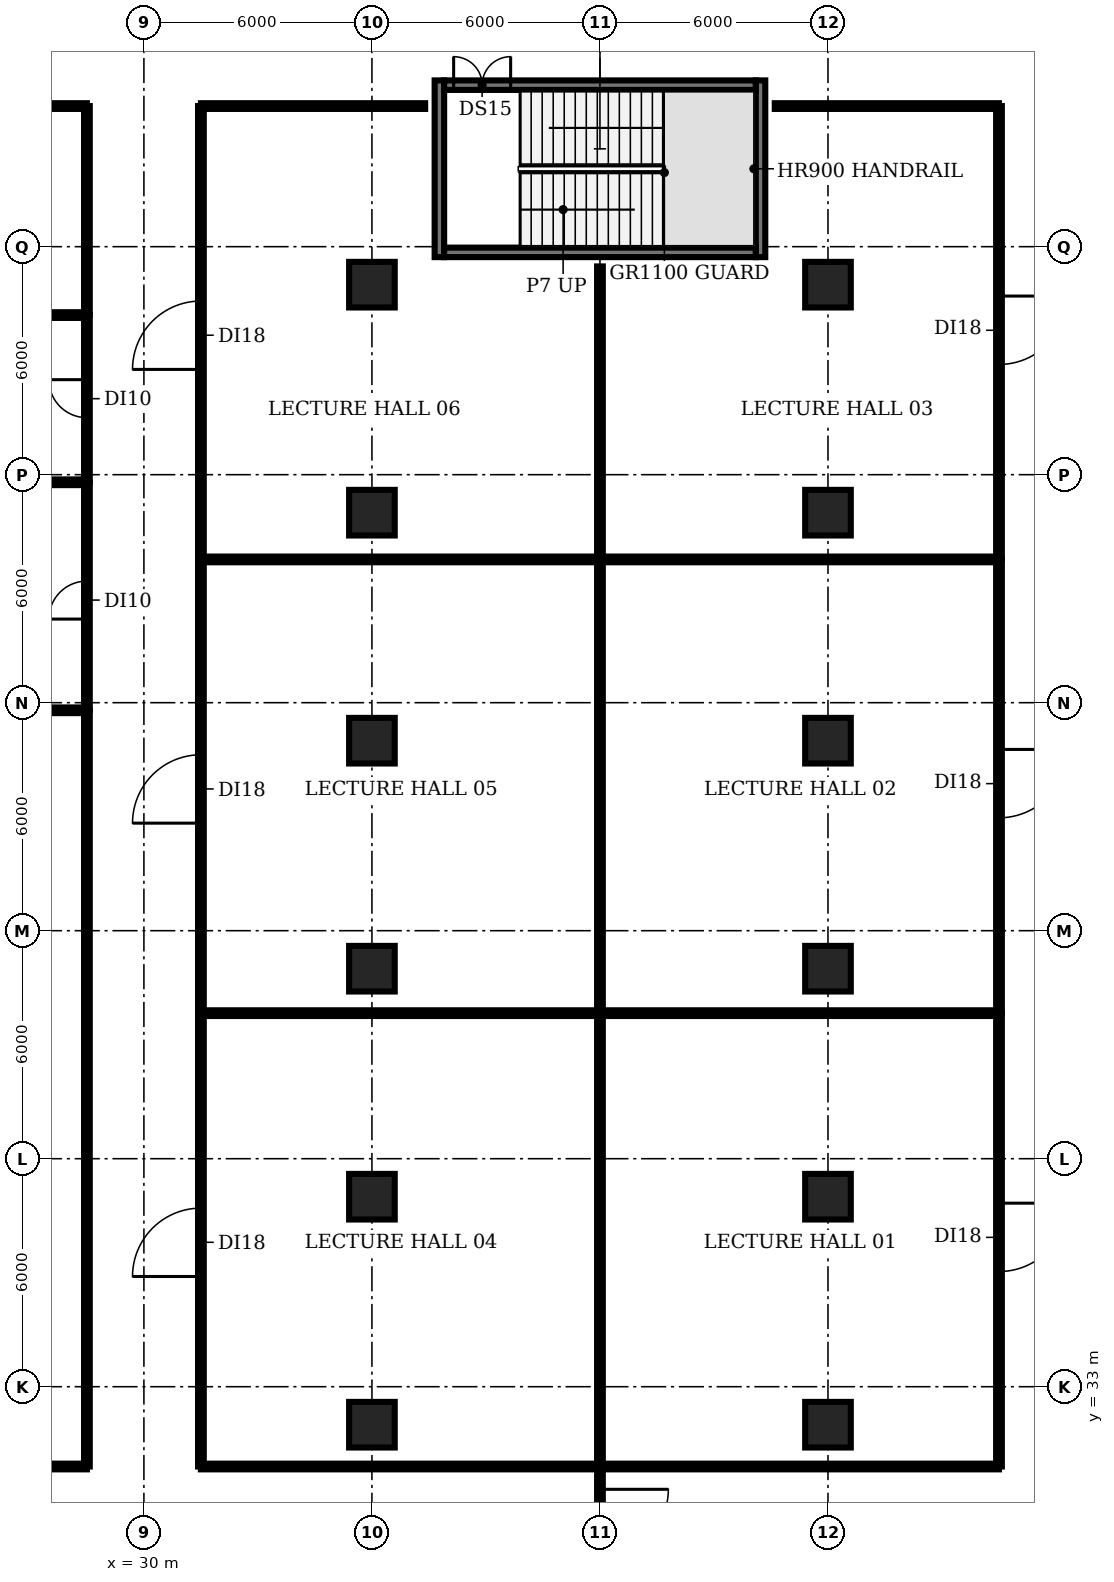
"""IFC4 building model, lengths in metres.
Left out: names, types, materials, properties, quantities, classifications, styles, units other than length and angle.
Written with IfcOpenShell. Run it as: python <this file> out.ifc"""

import sys

from ifc_helpers import new_model, si_unit, direction, frame, frame_2d, origin, origin_2d, place, context, subcontext, project, spatial, rectangle, extrude, element, fill, save


model = new_model("IFC4")
c1 = context("Model", 3, precision=1e-05, world=origin(), true_north=direction((0.0, 1.0)))
c2 = subcontext(c1, "Body", "Model", "MODEL_VIEW")
j1 = project(units=[si_unit("LENGTHUNIT", "METRE"), si_unit("PLANEANGLEUNIT", "RADIAN")], contexts=[c1])
p1 = place(None, origin())
s1 = spatial("IfcSite", under=j1, at=p1, CompositionType="ELEMENT")
p2 = place(p1, origin())
s2 = spatial("IfcBuilding", under=s1, at=p2, CompositionType="ELEMENT")
p3 = place(p2, frame((0.0, 0.0, 6.0)))
s3 = spatial("IfcBuildingStorey", under=s2, at=p3, CompositionType="ELEMENT", Elevation=6.0)
for number, where, z_axis, x_axis in (
    (1, (36.0, 32.0, 0.0), (0.0, 0.0, 1.0), (1.0, 0.0, 0.0)),
    (2, (36.0, 38.0, 0.0), (0.0, 0.0, 1.0), (1.0, 0.0, 0.0)),
    (3, (36.0, 44.0, 0.0), (0.0, 0.0, 1.0), (1.0, 0.0, 0.0)),
    (4, (36.0, 50.0, 0.0), (0.0, 0.0, 1.0), (1.0, 0.0, 0.0)),
    (5, (36.0, 56.0, 0.0), (0.0, 0.0, 1.0), (1.0, 0.0, 0.0)),
    (6, (36.0, 62.0, 0.0), (0.0, 0.0, 1.0), (1.0, 0.0, 0.0)),
    (7, (48.0, 32.0, 0.0), (0.0, 0.0, 1.0), (1.0, 0.0, 0.0)),
    (8, (48.0, 38.0, 0.0), (0.0, 0.0, 1.0), (1.0, 0.0, 0.0)),
    (9, (48.0, 44.0, 0.0), (0.0, 0.0, 1.0), (1.0, 0.0, 0.0)),
    (10, (48.0, 50.0, 0.0), (0.0, 0.0, 1.0), (1.0, 0.0, 0.0)),
    (11, (48.0, 56.0, 0.0), (0.0, 0.0, 1.0), (1.0, 0.0, 0.0)),
    (12, (48.0, 62.0, 0.0), (0.0, 0.0, 1.0), (1.0, 0.0, 0.0)),
):
    element("IfcColumn", number, at=place(p3, frame(where, z_axis=z_axis, x_axis=x_axis)), inside=s3, PredefinedType="COLUMN", context=c2, shape_type="SweptSolid", body=[
        extrude(rectangle(XDim=1.2, YDim=1.2, at=origin_2d()), origin(), (0.0, 0.0, 1.0), 4.6),
    ])
for number, where, z_axis, x_axis in (
    (13, (37.775, 62.725, 0.0), (0.0, 0.0, 1.0), (0.0, 1.0, 0.0)),
    (14, (46.225, 62.725, 0.0), (0.0, 0.0, 1.0), (0.0, 1.0, 0.0)),
):
    element("IfcWall", number, at=place(p3, frame(where, z_axis=z_axis, x_axis=x_axis)), inside=s3, PredefinedType="SHEAR", context=c2, shape_type="SweptSolid", body=[
        extrude(rectangle(XDim=4.65, YDim=0.25, at=frame_2d((2.325, 0.0))), origin(), (0.0, 0.0, 1.0), 4.6),
    ])
p4 = place(p3, frame((37.9, 62.85, 0.0), z_axis=(0.0, 0.0, 1.0), x_axis=(1.0, 0.0, 0.0)))
e15 = element("IfcWall", 15, at=p4, inside=s3, PredefinedType="SHEAR", context=c2, shape_type="SweptSolid", body=[
    extrude(rectangle(XDim=8.2, YDim=0.25, at=frame_2d((4.1, 0.0))), origin(), (0.0, 0.0, 1.0), 4.6),
])
p5 = place(p3, frame((37.9, 67.25, 0.0), z_axis=(0.0, 0.0, 1.0), x_axis=(1.0, 0.0, 0.0)))
e16 = element("IfcWall", 16, at=p5, inside=s3, PredefinedType="SHEAR", context=c2, shape_type="SweptSolid", body=[
    extrude(rectangle(XDim=8.2, YDim=0.25, at=frame_2d((4.1, 0.0))), origin(), (0.0, 0.0, 1.0), 4.6),
])
p6 = place(p5, frame((0.25, 0.0, 0.0)))
e17 = element("IfcOpeningElement", 17, at=p6, cuts=e16, PredefinedType="OPENING", context=c2, shape_type="SweptSolid", body=[
    extrude(rectangle(XDim=1.5, YDim=2.1, at=frame_2d((0.75, 1.05))), frame((0.0, 0.135, 0.0), z_axis=(0.0, -1.0, 0.0), x_axis=(1.0, 0.0, 0.0)), (0.0, 0.0, 1.0), 0.27),
])
p7 = place(p3, frame((-3.7, 50.8, 0.0), z_axis=(0.0, 0.0, 1.0), x_axis=(1.0, 0.0, 0.0)))
e18 = element("IfcWall", 18, at=p7, inside=s3, PredefinedType="PARTITIONING", context=c2, shape_type="SweptSolid", body=[
    extrude(rectangle(XDim=32.2, YDim=0.15, at=frame_2d((16.1, 0.0))), origin(), (0.0, 0.0, 1.0), 3.18),
])
for number, where, z_axis, x_axis in (
    (19, (5.58, 56.8, 0.0), (0.0, 0.0, 1.0), (1.0, 0.0, 0.0)),
    (20, (5.58, 61.2, 0.0), (0.0, 0.0, 1.0), (1.0, 0.0, 0.0)),
):
    element("IfcWall", number, at=place(p3, frame(where, z_axis=z_axis, x_axis=x_axis)), inside=s3, PredefinedType="PARTITIONING", context=c2, shape_type="SweptSolid", body=[
        extrude(rectangle(XDim=22.92, YDim=0.15, at=frame_2d((11.46, 0.0))), origin(), (0.0, 0.0, 1.0), 3.18),
    ])
p8 = place(p3, frame((24.4, 30.9, 0.0), z_axis=(0.0, 0.0, 1.0), x_axis=(1.0, 0.0, 0.0)))
e21 = element("IfcWall", 21, at=p8, inside=s3, PredefinedType="PARTITIONING", context=c2, shape_type="SweptSolid", body=[
    extrude(rectangle(XDim=4.1, YDim=0.15, at=frame_2d((2.05, 0.0))), origin(), (0.0, 0.0, 1.0), 3.18),
])
p9 = place(p3, frame((28.5, 30.9, 0.0), z_axis=(0.0, 0.0, 1.0), x_axis=(0.0, 1.0, 0.0)))
e22 = element("IfcWall", 22, at=p9, inside=s3, PredefinedType="PARTITIONING", context=c2, shape_type="SweptSolid", body=[
    extrude(rectangle(XDim=19.9, YDim=0.15, at=frame_2d((9.95, 0.0))), origin(), (0.0, 0.0, 1.0), 3.18),
])
p10 = place(p3, frame((28.5, 50.8, 0.0), z_axis=(0.0, 0.0, 1.0), x_axis=(0.0, 1.0, 0.0)))
e23 = element("IfcWall", 23, at=p10, inside=s3, PredefinedType="PARTITIONING", context=c2, shape_type="SweptSolid", body=[
    extrude(rectangle(XDim=6.0, YDim=0.15, at=frame_2d((3.0, 0.0))), origin(), (0.0, 0.0, 1.0), 3.18),
])
p11 = place(p10, frame((2.4, 0.0, 0.0)))
e24 = element("IfcOpeningElement", 24, at=p11, cuts=e23, PredefinedType="OPENING", context=c2, shape_type="SweptSolid", body=[
    extrude(rectangle(XDim=1.0, YDim=2.1, at=frame_2d((0.5, 1.05))), frame((0.0, 0.085, 0.0), z_axis=(0.0, -1.0, 0.0), x_axis=(1.0, 0.0, 0.0)), (0.0, 0.0, 1.0), 0.17),
])
p12 = place(p3, frame((28.5, 56.8, 0.0), z_axis=(0.0, 0.0, 1.0), x_axis=(0.0, 1.0, 0.0)))
e25 = element("IfcWall", 25, at=p12, inside=s3, PredefinedType="PARTITIONING", context=c2, shape_type="SweptSolid", body=[
    extrude(rectangle(XDim=4.4, YDim=0.15, at=frame_2d((2.2, 0.0))), origin(), (0.0, 0.0, 1.0), 3.18),
])
p13 = place(p12, frame((1.7, 0.0, 0.0)))
e26 = element("IfcOpeningElement", 26, at=p13, cuts=e25, PredefinedType="OPENING", context=c2, shape_type="SweptSolid", body=[
    extrude(rectangle(XDim=1.0, YDim=2.1, at=frame_2d((0.5, 1.05))), frame((0.0, 0.085, 0.0), z_axis=(0.0, -1.0, 0.0), x_axis=(1.0, 0.0, 0.0)), (0.0, 0.0, 1.0), 0.17),
])
p14 = place(p3, frame((28.5, 61.2, 0.0), z_axis=(0.0, 0.0, 1.0), x_axis=(0.0, 1.0, 0.0)))
e27 = element("IfcWall", 27, at=p14, inside=s3, PredefinedType="PARTITIONING", context=c2, shape_type="SweptSolid", body=[
    extrude(rectangle(XDim=5.5, YDim=0.15, at=frame_2d((2.75, 0.0))), origin(), (0.0, 0.0, 1.0), 3.18),
])
p15 = place(p3, frame((28.5, 66.7, 0.0), z_axis=(0.0, 0.0, 1.0), x_axis=(-1.0, 0.0, 0.0)))
e28 = element("IfcWall", 28, at=p15, inside=s3, PredefinedType="PARTITIONING", context=c2, shape_type="SweptSolid", body=[
    extrude(rectangle(XDim=27.55, YDim=0.15, at=frame_2d((13.775, 0.0))), origin(), (0.0, 0.0, 1.0), 3.18),
])
p16 = place(p15, frame((13.15, 0.0, 0.0)))
e29 = element("IfcOpeningElement", 29, at=p16, cuts=e28, PredefinedType="OPENING", context=c2, shape_type="SweptSolid", body=[
    extrude(rectangle(XDim=1.0, YDim=2.1, at=frame_2d((0.5, 1.05))), frame((0.0, 0.085, 0.0), z_axis=(0.0, -1.0, 0.0), x_axis=(1.0, 0.0, 0.0)), (0.0, 0.0, 1.0), 0.17),
])
p17 = place(p3, frame((31.5, 30.9, 0.0), z_axis=(0.0, 0.0, 1.0), x_axis=(0.0, 1.0, 0.0)))
e30 = element("IfcWall", 30, at=p17, inside=s3, PredefinedType="PARTITIONING", context=c2, shape_type="SweptSolid", body=[
    extrude(rectangle(XDim=11.93, YDim=0.15, at=frame_2d((5.965, 0.0))), origin(), (0.0, 0.0, 1.0), 3.18),
])
p18 = place(p17, frame((5.0, 0.0, 0.0)))
e31 = element("IfcOpeningElement", 31, at=p18, cuts=e30, PredefinedType="OPENING", context=c2, shape_type="SweptSolid", body=[
    extrude(rectangle(XDim=1.8, YDim=2.1, at=frame_2d((0.9, 1.05))), frame((0.0, 0.085, 0.0), z_axis=(0.0, -1.0, 0.0), x_axis=(1.0, 0.0, 0.0)), (0.0, 0.0, 1.0), 0.17),
])
p19 = place(p3, frame((31.5, 30.9, 0.0), z_axis=(0.0, 0.0, 1.0), x_axis=(1.0, 0.0, 0.0)))
e32 = element("IfcWall", 32, at=p19, inside=s3, PredefinedType="PARTITIONING", context=c2, shape_type="SweptSolid", body=[
    extrude(rectangle(XDim=21.0, YDim=0.15, at=frame_2d((10.5, 0.0))), origin(), (0.0, 0.0, 1.0), 3.18),
])
p20 = place(p3, frame((31.5, 42.83, 0.0), z_axis=(0.0, 0.0, 1.0), x_axis=(0.0, 1.0, 0.0)))
e33 = element("IfcWall", 33, at=p20, inside=s3, PredefinedType="PARTITIONING", context=c2, shape_type="SweptSolid", body=[
    extrude(rectangle(XDim=11.94, YDim=0.15, at=frame_2d((5.97, 0.0))), origin(), (0.0, 0.0, 1.0), 3.18),
])
p21 = place(p20, frame((5.0, 0.0, 0.0)))
e34 = element("IfcOpeningElement", 34, at=p21, cuts=e33, PredefinedType="OPENING", context=c2, shape_type="SweptSolid", body=[
    extrude(rectangle(XDim=1.8, YDim=2.1, at=frame_2d((0.9, 1.05))), frame((0.0, 0.085, 0.0), z_axis=(0.0, -1.0, 0.0), x_axis=(1.0, 0.0, 0.0)), (0.0, 0.0, 1.0), 0.17),
])
p22 = place(p3, frame((31.5, 42.83, 0.0), z_axis=(0.0, 0.0, 1.0), x_axis=(1.0, 0.0, 0.0)))
e35 = element("IfcWall", 35, at=p22, inside=s3, PredefinedType="PARTITIONING", context=c2, shape_type="SweptSolid", body=[
    extrude(rectangle(XDim=21.0, YDim=0.15, at=frame_2d((10.5, 0.0))), origin(), (0.0, 0.0, 1.0), 3.18),
])
p23 = place(p3, frame((31.5, 54.77, 0.0), z_axis=(0.0, 0.0, 1.0), x_axis=(0.0, 1.0, 0.0)))
e36 = element("IfcWall", 36, at=p23, inside=s3, PredefinedType="PARTITIONING", context=c2, shape_type="SweptSolid", body=[
    extrude(rectangle(XDim=11.93, YDim=0.15, at=frame_2d((5.965, 0.0))), origin(), (0.0, 0.0, 1.0), 3.18),
])
p24 = place(p23, frame((5.0, 0.0, 0.0)))
e37 = element("IfcOpeningElement", 37, at=p24, cuts=e36, PredefinedType="OPENING", context=c2, shape_type="SweptSolid", body=[
    extrude(rectangle(XDim=1.8, YDim=2.1, at=frame_2d((0.9, 1.05))), frame((0.0, 0.085, 0.0), z_axis=(0.0, -1.0, 0.0), x_axis=(1.0, 0.0, 0.0)), (0.0, 0.0, 1.0), 0.17),
])
p25 = place(p3, frame((31.5, 54.77, 0.0), z_axis=(0.0, 0.0, 1.0), x_axis=(1.0, 0.0, 0.0)))
e38 = element("IfcWall", 38, at=p25, inside=s3, PredefinedType="PARTITIONING", context=c2, shape_type="SweptSolid", body=[
    extrude(rectangle(XDim=21.0, YDim=0.15, at=frame_2d((10.5, 0.0))), origin(), (0.0, 0.0, 1.0), 3.18),
])
p26 = place(p3, frame((31.5, 66.7, 0.0), z_axis=(0.0, 0.0, 1.0), x_axis=(1.0, 0.0, 0.0)))
e39 = element("IfcWall", 39, at=p26, inside=s3, PredefinedType="PARTITIONING", context=c2, shape_type="SweptSolid", body=[
    extrude(rectangle(XDim=5.9, YDim=0.15, at=frame_2d((2.95, 0.0))), origin(), (0.0, 0.0, 1.0), 3.18),
])
p27 = place(p3, frame((42.0, 30.9, 0.0), z_axis=(0.0, 0.0, 1.0), x_axis=(0.0, -1.0, 0.0)))
e40 = element("IfcWall", 40, at=p27, inside=s3, PredefinedType="PARTITIONING", context=c2, shape_type="SweptSolid", body=[
    extrude(rectangle(XDim=3.0, YDim=0.15, at=frame_2d((1.5, 0.0))), origin(), (0.0, 0.0, 1.0), 3.18),
])
p28 = place(p27, frame((0.6, 0.0, 0.0)))
e41 = element("IfcOpeningElement", 41, at=p28, cuts=e40, PredefinedType="OPENING", context=c2, shape_type="SweptSolid", body=[
    extrude(rectangle(XDim=1.8, YDim=2.1, at=frame_2d((0.9, 1.05))), frame((0.0, 0.085, 0.0), z_axis=(0.0, -1.0, 0.0), x_axis=(1.0, 0.0, 0.0)), (0.0, 0.0, 1.0), 0.17),
])
p29 = place(p3, frame((42.0, 30.9, 0.0), z_axis=(0.0, 0.0, 1.0), x_axis=(0.0, 1.0, 0.0)))
e42 = element("IfcWall", 42, at=p29, inside=s3, PredefinedType="PARTITIONING", context=c2, shape_type="SweptSolid", body=[
    extrude(rectangle(XDim=31.58, YDim=0.15, at=frame_2d((15.79, 0.0))), origin(), (0.0, 0.0, 1.0), 3.18),
])
p30 = place(p3, frame((46.6, 66.7, 0.0), z_axis=(0.0, 0.0, 1.0), x_axis=(1.0, 0.0, 0.0)))
e43 = element("IfcWall", 43, at=p30, inside=s3, PredefinedType="PARTITIONING", context=c2, shape_type="SweptSolid", body=[
    extrude(rectangle(XDim=5.9, YDim=0.15, at=frame_2d((2.95, 0.0))), origin(), (0.0, 0.0, 1.0), 3.18),
])
p31 = place(p3, frame((52.5, 42.83, 0.0), z_axis=(0.0, 0.0, 1.0), x_axis=(0.0, -1.0, 0.0)))
e44 = element("IfcWall", 44, at=p31, inside=s3, PredefinedType="PARTITIONING", context=c2, shape_type="SweptSolid", body=[
    extrude(rectangle(XDim=11.93, YDim=0.15, at=frame_2d((5.965, 0.0))), origin(), (0.0, 0.0, 1.0), 3.18),
])
p32 = place(p31, frame((5.0, 0.0, 0.0)))
e45 = element("IfcOpeningElement", 45, at=p32, cuts=e44, PredefinedType="OPENING", context=c2, shape_type="SweptSolid", body=[
    extrude(rectangle(XDim=1.8, YDim=2.1, at=frame_2d((0.9, 1.05))), frame((0.0, 0.085, 0.0), z_axis=(0.0, -1.0, 0.0), x_axis=(1.0, 0.0, 0.0)), (0.0, 0.0, 1.0), 0.17),
])
p33 = place(p3, frame((52.5, 54.77, 0.0), z_axis=(0.0, 0.0, 1.0), x_axis=(0.0, -1.0, 0.0)))
e46 = element("IfcWall", 46, at=p33, inside=s3, PredefinedType="PARTITIONING", context=c2, shape_type="SweptSolid", body=[
    extrude(rectangle(XDim=11.94, YDim=0.15, at=frame_2d((5.97, 0.0))), origin(), (0.0, 0.0, 1.0), 3.18),
])
p34 = place(p33, frame((5.0, 0.0, 0.0)))
e47 = element("IfcOpeningElement", 47, at=p34, cuts=e46, PredefinedType="OPENING", context=c2, shape_type="SweptSolid", body=[
    extrude(rectangle(XDim=1.8, YDim=2.1, at=frame_2d((0.9, 1.05))), frame((0.0, 0.085, 0.0), z_axis=(0.0, -1.0, 0.0), x_axis=(1.0, 0.0, 0.0)), (0.0, 0.0, 1.0), 0.17),
])
p35 = place(p3, frame((52.5, 66.7, 0.0), z_axis=(0.0, 0.0, 1.0), x_axis=(0.0, -1.0, 0.0)))
e48 = element("IfcWall", 48, at=p35, inside=s3, PredefinedType="PARTITIONING", context=c2, shape_type="SweptSolid", body=[
    extrude(rectangle(XDim=11.93, YDim=0.15, at=frame_2d((5.965, 0.0))), origin(), (0.0, 0.0, 1.0), 3.18),
])
p36 = place(p35, frame((5.0, 0.0, 0.0)))
e49 = element("IfcOpeningElement", 49, at=p36, cuts=e48, PredefinedType="OPENING", context=c2, shape_type="SweptSolid", body=[
    extrude(rectangle(XDim=1.8, YDim=2.1, at=frame_2d((0.9, 1.05))), frame((0.0, 0.085, 0.0), z_axis=(0.0, -1.0, 0.0), x_axis=(1.0, 0.0, 0.0)), (0.0, 0.0, 1.0), 0.17),
])
p37 = place(p6, origin())
e50 = element("IfcDoor", 50, at=p37, inside=s3, OperationType="DOUBLE_DOOR_SINGLE_SWING", PredefinedType="DOOR", context=c2, shape_type="SweptSolid", body=[
    extrude(rectangle(XDim=1.5, YDim=2.1, at=frame_2d((0.75, 1.05))), frame((0.0, 0.025, 0.0), z_axis=(0.0, -1.0, 0.0), x_axis=(1.0, 0.0, 0.0)), (0.0, 0.0, 1.0), 0.05),
])
fill(e17, e50)
p38 = place(p11, origin())
e51 = element("IfcDoor", 51, at=p38, inside=s3, OperationType="SINGLE_SWING_LEFT", PredefinedType="DOOR", context=c2, shape_type="SweptSolid", body=[
    extrude(rectangle(XDim=1.0, YDim=2.1, at=frame_2d((0.5, 1.05))), frame((0.0, 0.025, 0.0), z_axis=(0.0, -1.0, 0.0), x_axis=(1.0, 0.0, 0.0)), (0.0, 0.0, 1.0), 0.05),
])
fill(e24, e51)
p39 = place(p13, origin())
e52 = element("IfcDoor", 52, at=p39, inside=s3, OperationType="SINGLE_SWING_RIGHT", PredefinedType="DOOR", context=c2, shape_type="SweptSolid", body=[
    extrude(rectangle(XDim=1.0, YDim=2.1, at=frame_2d((0.5, 1.05))), frame((0.0, 0.025, 0.0), z_axis=(0.0, -1.0, 0.0), x_axis=(1.0, 0.0, 0.0)), (0.0, 0.0, 1.0), 0.05),
])
fill(e26, e52)
p40 = place(p18, origin())
e53 = element("IfcDoor", 53, at=p40, inside=s3, OperationType="SINGLE_SWING_LEFT", PredefinedType="DOOR", context=c2, shape_type="SweptSolid", body=[
    extrude(rectangle(XDim=1.8, YDim=2.1, at=frame_2d((0.9, 1.05))), frame((0.0, 0.025, 0.0), z_axis=(0.0, -1.0, 0.0), x_axis=(1.0, 0.0, 0.0)), (0.0, 0.0, 1.0), 0.05),
])
fill(e31, e53)
p41 = place(p21, origin())
e54 = element("IfcDoor", 54, at=p41, inside=s3, OperationType="SINGLE_SWING_LEFT", PredefinedType="DOOR", context=c2, shape_type="SweptSolid", body=[
    extrude(rectangle(XDim=1.8, YDim=2.1, at=frame_2d((0.9, 1.05))), frame((0.0, 0.025, 0.0), z_axis=(0.0, -1.0, 0.0), x_axis=(1.0, 0.0, 0.0)), (0.0, 0.0, 1.0), 0.05),
])
fill(e34, e54)
p42 = place(p24, origin())
e55 = element("IfcDoor", 55, at=p42, inside=s3, OperationType="SINGLE_SWING_LEFT", PredefinedType="DOOR", context=c2, shape_type="SweptSolid", body=[
    extrude(rectangle(XDim=1.8, YDim=2.1, at=frame_2d((0.9, 1.05))), frame((0.0, 0.025, 0.0), z_axis=(0.0, -1.0, 0.0), x_axis=(1.0, 0.0, 0.0)), (0.0, 0.0, 1.0), 0.05),
])
fill(e37, e55)
p43 = place(p28, origin())
e56 = element("IfcDoor", 56, at=p43, inside=s3, OperationType="SINGLE_SWING_LEFT", PredefinedType="DOOR", context=c2, shape_type="SweptSolid", body=[
    extrude(rectangle(XDim=1.8, YDim=2.1, at=frame_2d((0.9, 1.05))), frame((0.0, 0.025, 0.0), z_axis=(0.0, -1.0, 0.0), x_axis=(1.0, 0.0, 0.0)), (0.0, 0.0, 1.0), 0.05),
])
fill(e41, e56)
p44 = place(p32, origin())
e57 = element("IfcDoor", 57, at=p44, inside=s3, OperationType="SINGLE_SWING_LEFT", PredefinedType="DOOR", context=c2, shape_type="SweptSolid", body=[
    extrude(rectangle(XDim=1.8, YDim=2.1, at=frame_2d((0.9, 1.05))), frame((0.0, 0.025, 0.0), z_axis=(0.0, -1.0, 0.0), x_axis=(1.0, 0.0, 0.0)), (0.0, 0.0, 1.0), 0.05),
])
fill(e45, e57)
p45 = place(p34, origin())
e58 = element("IfcDoor", 58, at=p45, inside=s3, OperationType="SINGLE_SWING_LEFT", PredefinedType="DOOR", context=c2, shape_type="SweptSolid", body=[
    extrude(rectangle(XDim=1.8, YDim=2.1, at=frame_2d((0.9, 1.05))), frame((0.0, 0.025, 0.0), z_axis=(0.0, -1.0, 0.0), x_axis=(1.0, 0.0, 0.0)), (0.0, 0.0, 1.0), 0.05),
])
fill(e47, e58)
p46 = place(p36, origin())
e59 = element("IfcDoor", 59, at=p46, inside=s3, OperationType="SINGLE_SWING_LEFT", PredefinedType="DOOR", context=c2, shape_type="SweptSolid", body=[
    extrude(rectangle(XDim=1.8, YDim=2.1, at=frame_2d((0.9, 1.05))), frame((0.0, 0.025, 0.0), z_axis=(0.0, -1.0, 0.0), x_axis=(1.0, 0.0, 0.0)), (0.0, 0.0, 1.0), 0.05),
])
fill(e49, e59)
save(model, sys.argv[1])
